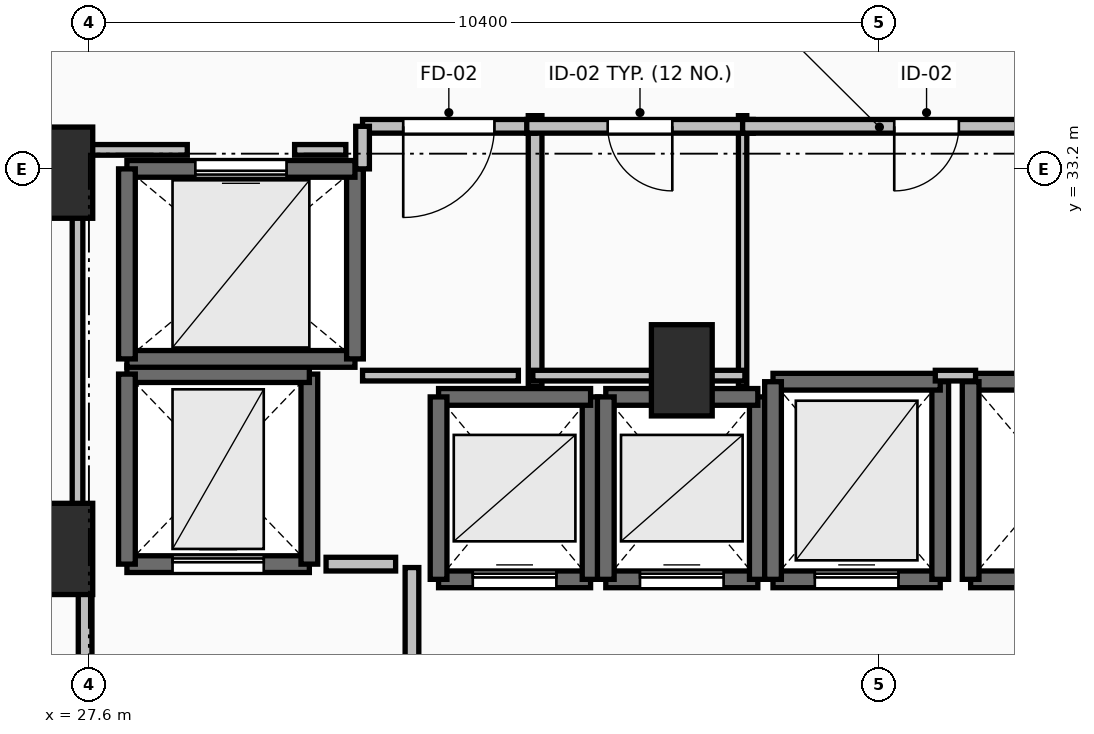
"""IFC4 building model, lengths in metres.
Left out: names, types, materials, properties, quantities, classifications, styles, units other than length and angle.
Written with IfcOpenShell. Run it as: python <this file> out.ifc"""

import sys

from ifc_helpers import new_model, si_unit, direction, frame, frame_2d, origin, origin_2d, place, context, subcontext, project, spatial, rectangle, extrude, element, fill, save


model = new_model("IFC4")
c1 = context("Model", 3, precision=1e-05, world=origin(), true_north=direction((0.0, 1.0)))
c2 = subcontext(c1, "Body", "Model", "MODEL_VIEW")
j1 = project(units=[si_unit("LENGTHUNIT", "METRE"), si_unit("PLANEANGLEUNIT", "RADIAN")], contexts=[c1])
p1 = place(None, origin())
s1 = spatial("IfcSite", under=j1, at=p1, CompositionType="ELEMENT")
p2 = place(p1, origin())
s2 = spatial("IfcBuilding", under=s1, at=p2, CompositionType="ELEMENT")
p3 = place(p2, frame((0.0, 0.0, 55.5)))
s3 = spatial("IfcBuildingStorey", under=s2, at=p3, CompositionType="ELEMENT", Elevation=55.5)
for number, where, z_axis, x_axis in (
    (1, (27.25, 28.2, 0.0), (0.0, 0.0, 1.0), (1.0, 0.0, 0.0)),
    (2, (27.25, 33.15, 0.0), (0.0, 0.0, 1.0), (1.0, 0.0, 0.0)),
    (3, (35.4, 30.55, 0.0), (0.0, 0.0, 1.0), (1.0, 0.0, 0.0)),
):
    element("IfcColumn", number, at=place(p3, frame(where, z_axis=z_axis, x_axis=x_axis)), inside=s3, PredefinedType="PILASTER", context=c2, shape_type="SweptSolid", body=[
        extrude(rectangle(XDim=0.8, YDim=1.2, at=origin_2d()), origin(), (0.0, 0.0, 1.0), 3.5),
    ])
p4 = place(p3, frame((32.2, 27.8, 0.0), z_axis=(0.0, 0.0, 1.0), x_axis=(1.0, 0.0, 0.0)))
e4 = element("IfcWall", 4, at=p4, inside=s3, PredefinedType="SOLIDWALL", context=c2, shape_type="SweptSolid", body=[
    extrude(rectangle(XDim=2.0, YDim=0.22, at=frame_2d((1.0, 0.0))), origin(), (0.0, 0.0, 1.0), 3.24),
])
p5 = place(p4, frame((0.45, 0.0, 0.0)))
e5 = element("IfcOpeningElement", 5, at=p5, cuts=e4, PredefinedType="OPENING", context=c2, shape_type="SweptSolid", body=[
    extrude(rectangle(XDim=1.1, YDim=2.2, at=frame_2d((0.55, 1.1))), frame((0.0, 0.125, 0.0), z_axis=(0.0, -1.0, 0.0), x_axis=(1.0, 0.0, 0.0)), (0.0, 0.0, 1.0), 0.25),
])
p6 = place(p3, frame((34.2, 27.8, 0.0), z_axis=(0.0, 0.0, 1.0), x_axis=(0.0, 1.0, 0.0)))
e6 = element("IfcWall", 6, at=p6, inside=s3, PredefinedType="SOLIDWALL", context=c2, shape_type="SweptSolid", body=[
    extrude(rectangle(XDim=2.4, YDim=0.22, at=frame_2d((1.2, 0.0))), origin(), (0.0, 0.0, 1.0), 3.24),
])
p7 = place(p3, frame((34.2, 30.2, 0.0), z_axis=(0.0, 0.0, 1.0), x_axis=(-1.0, 0.0, 0.0)))
e7 = element("IfcWall", 7, at=p7, inside=s3, PredefinedType="SOLIDWALL", context=c2, shape_type="SweptSolid", body=[
    extrude(rectangle(XDim=2.0, YDim=0.22, at=frame_2d((1.0, 0.0))), origin(), (0.0, 0.0, 1.0), 3.24),
])
p8 = place(p3, frame((32.2, 30.2, 0.0), z_axis=(0.0, 0.0, 1.0), x_axis=(0.0, -1.0, 0.0)))
e8 = element("IfcWall", 8, at=p8, inside=s3, PredefinedType="SOLIDWALL", context=c2, shape_type="SweptSolid", body=[
    extrude(rectangle(XDim=2.4, YDim=0.22, at=frame_2d((1.2, 0.0))), origin(), (0.0, 0.0, 1.0), 3.24),
])
p9 = place(p3, frame((34.4, 27.8, 0.0), z_axis=(0.0, 0.0, 1.0), x_axis=(1.0, 0.0, 0.0)))
e9 = element("IfcWall", 9, at=p9, inside=s3, PredefinedType="SOLIDWALL", context=c2, shape_type="SweptSolid", body=[
    extrude(rectangle(XDim=2.0, YDim=0.22, at=frame_2d((1.0, 0.0))), origin(), (0.0, 0.0, 1.0), 3.24),
])
p10 = place(p9, frame((0.45, 0.0, 0.0)))
e10 = element("IfcOpeningElement", 10, at=p10, cuts=e9, PredefinedType="OPENING", context=c2, shape_type="SweptSolid", body=[
    extrude(rectangle(XDim=1.1, YDim=2.2, at=frame_2d((0.55, 1.1))), frame((0.0, 0.125, 0.0), z_axis=(0.0, -1.0, 0.0), x_axis=(1.0, 0.0, 0.0)), (0.0, 0.0, 1.0), 0.25),
])
p11 = place(p3, frame((36.4, 27.8, 0.0), z_axis=(0.0, 0.0, 1.0), x_axis=(0.0, 1.0, 0.0)))
e11 = element("IfcWall", 11, at=p11, inside=s3, PredefinedType="SOLIDWALL", context=c2, shape_type="SweptSolid", body=[
    extrude(rectangle(XDim=2.4, YDim=0.22, at=frame_2d((1.2, 0.0))), origin(), (0.0, 0.0, 1.0), 3.24),
])
p12 = place(p3, frame((36.4, 30.2, 0.0), z_axis=(0.0, 0.0, 1.0), x_axis=(-1.0, 0.0, 0.0)))
e12 = element("IfcWall", 12, at=p12, inside=s3, PredefinedType="SOLIDWALL", context=c2, shape_type="SweptSolid", body=[
    extrude(rectangle(XDim=2.0, YDim=0.22, at=frame_2d((1.0, 0.0))), origin(), (0.0, 0.0, 1.0), 3.24),
])
p13 = place(p3, frame((34.4, 30.2, 0.0), z_axis=(0.0, 0.0, 1.0), x_axis=(0.0, -1.0, 0.0)))
e13 = element("IfcWall", 13, at=p13, inside=s3, PredefinedType="SOLIDWALL", context=c2, shape_type="SweptSolid", body=[
    extrude(rectangle(XDim=2.4, YDim=0.22, at=frame_2d((1.2, 0.0))), origin(), (0.0, 0.0, 1.0), 3.24),
])
p14 = place(p3, frame((36.6, 27.8, 0.0), z_axis=(0.0, 0.0, 1.0), x_axis=(1.0, 0.0, 0.0)))
e14 = element("IfcWall", 14, at=p14, inside=s3, PredefinedType="SOLIDWALL", context=c2, shape_type="SweptSolid", body=[
    extrude(rectangle(XDim=2.2, YDim=0.22, at=frame_2d((1.1, 0.0))), origin(), (0.0, 0.0, 1.0), 3.24),
])
p15 = place(p14, frame((0.55, 0.0, 0.0)))
e15 = element("IfcOpeningElement", 15, at=p15, cuts=e14, PredefinedType="OPENING", context=c2, shape_type="SweptSolid", body=[
    extrude(rectangle(XDim=1.1, YDim=2.2, at=frame_2d((0.55, 1.1))), frame((0.0, 0.125, 0.0), z_axis=(0.0, -1.0, 0.0), x_axis=(1.0, 0.0, 0.0)), (0.0, 0.0, 1.0), 0.25),
])
p16 = place(p3, frame((38.8, 27.8, 0.0), z_axis=(0.0, 0.0, 1.0), x_axis=(0.0, 1.0, 0.0)))
e16 = element("IfcWall", 16, at=p16, inside=s3, PredefinedType="SOLIDWALL", context=c2, shape_type="SweptSolid", body=[
    extrude(rectangle(XDim=2.6, YDim=0.22, at=frame_2d((1.3, 0.0))), origin(), (0.0, 0.0, 1.0), 3.24),
])
p17 = place(p3, frame((38.8, 30.4, 0.0), z_axis=(0.0, 0.0, 1.0), x_axis=(-1.0, 0.0, 0.0)))
e17 = element("IfcWall", 17, at=p17, inside=s3, PredefinedType="SOLIDWALL", context=c2, shape_type="SweptSolid", body=[
    extrude(rectangle(XDim=2.2, YDim=0.22, at=frame_2d((1.1, 0.0))), origin(), (0.0, 0.0, 1.0), 3.24),
])
p18 = place(p3, frame((36.6, 30.4, 0.0), z_axis=(0.0, 0.0, 1.0), x_axis=(0.0, -1.0, 0.0)))
e18 = element("IfcWall", 18, at=p18, inside=s3, PredefinedType="SOLIDWALL", context=c2, shape_type="SweptSolid", body=[
    extrude(rectangle(XDim=2.6, YDim=0.22, at=frame_2d((1.3, 0.0))), origin(), (0.0, 0.0, 1.0), 3.24),
])
for number, where, z_axis, x_axis in (
    (19, (39.2, 27.8, 0.0), (0.0, 0.0, 1.0), (1.0, 0.0, 0.0)),
    (20, (41.4, 30.4, 0.0), (0.0, 0.0, 1.0), (-1.0, 0.0, 0.0)),
):
    element("IfcWall", number, at=place(p3, frame(where, z_axis=z_axis, x_axis=x_axis)), inside=s3, PredefinedType="SOLIDWALL", context=c2, shape_type="SweptSolid", body=[
        extrude(rectangle(XDim=2.2, YDim=0.22, at=frame_2d((1.1, 0.0))), origin(), (0.0, 0.0, 1.0), 3.24),
    ])
p19 = place(p3, frame((39.2, 30.4, 0.0), z_axis=(0.0, 0.0, 1.0), x_axis=(0.0, -1.0, 0.0)))
e21 = element("IfcWall", 21, at=p19, inside=s3, PredefinedType="SOLIDWALL", context=c2, shape_type="SweptSolid", body=[
    extrude(rectangle(XDim=2.6, YDim=0.22, at=frame_2d((1.3, 0.0))), origin(), (0.0, 0.0, 1.0), 3.24),
])
p20 = place(p3, frame((28.1, 28.0, 0.0), z_axis=(0.0, 0.0, 1.0), x_axis=(1.0, 0.0, 0.0)))
e22 = element("IfcWall", 22, at=p20, inside=s3, PredefinedType="SHEAR", context=c2, shape_type="SweptSolid", body=[
    extrude(rectangle(XDim=2.4, YDim=0.22, at=frame_2d((1.2, 0.0))), origin(), (0.0, 0.0, 1.0), 3.24),
])
p21 = place(p20, frame((0.6, 0.0, 0.0)))
e23 = element("IfcOpeningElement", 23, at=p21, cuts=e22, PredefinedType="OPENING", context=c2, shape_type="SweptSolid", body=[
    extrude(rectangle(XDim=1.2, YDim=2.2, at=frame_2d((0.6, 1.1))), frame((0.0, 0.125, 0.0), z_axis=(0.0, -1.0, 0.0), x_axis=(1.0, 0.0, 0.0)), (0.0, 0.0, 1.0), 0.25),
])
p22 = place(p3, frame((30.5, 28.0, 0.0), z_axis=(0.0, 0.0, 1.0), x_axis=(0.0, 1.0, 0.0)))
e24 = element("IfcWall", 24, at=p22, inside=s3, PredefinedType="SHEAR", context=c2, shape_type="SweptSolid", body=[
    extrude(rectangle(XDim=2.5, YDim=0.22, at=frame_2d((1.25, 0.0))), origin(), (0.0, 0.0, 1.0), 3.24),
])
p23 = place(p3, frame((30.5, 30.5, 0.0), z_axis=(0.0, 0.0, 1.0), x_axis=(-1.0, 0.0, 0.0)))
e25 = element("IfcWall", 25, at=p23, inside=s3, PredefinedType="SHEAR", context=c2, shape_type="SweptSolid", body=[
    extrude(rectangle(XDim=2.4, YDim=0.22, at=frame_2d((1.2, 0.0))), origin(), (0.0, 0.0, 1.0), 3.24),
])
p24 = place(p3, frame((28.1, 30.5, 0.0), z_axis=(0.0, 0.0, 1.0), x_axis=(0.0, -1.0, 0.0)))
e26 = element("IfcWall", 26, at=p24, inside=s3, PredefinedType="SHEAR", context=c2, shape_type="SweptSolid", body=[
    extrude(rectangle(XDim=2.5, YDim=0.22, at=frame_2d((1.25, 0.0))), origin(), (0.0, 0.0, 1.0), 3.24),
])
p25 = place(p3, frame((28.1, 30.7, 0.0), z_axis=(0.0, 0.0, 1.0), x_axis=(1.0, 0.0, 0.0)))
e27 = element("IfcWall", 27, at=p25, inside=s3, PredefinedType="SOLIDWALL", context=c2, shape_type="SweptSolid", body=[
    extrude(rectangle(XDim=3.0, YDim=0.22, at=frame_2d((1.5, 0.0))), origin(), (0.0, 0.0, 1.0), 3.24),
])
p26 = place(p3, frame((31.1, 30.7, 0.0), z_axis=(0.0, 0.0, 1.0), x_axis=(0.0, 1.0, 0.0)))
e28 = element("IfcWall", 28, at=p26, inside=s3, PredefinedType="SOLIDWALL", context=c2, shape_type="SweptSolid", body=[
    extrude(rectangle(XDim=2.5, YDim=0.22, at=frame_2d((1.25, 0.0))), origin(), (0.0, 0.0, 1.0), 3.24),
])
p27 = place(p3, frame((31.1, 33.2, 0.0), z_axis=(0.0, 0.0, 1.0), x_axis=(-1.0, 0.0, 0.0)))
e29 = element("IfcWall", 29, at=p27, inside=s3, PredefinedType="SOLIDWALL", context=c2, shape_type="SweptSolid", body=[
    extrude(rectangle(XDim=3.0, YDim=0.22, at=frame_2d((1.5, 0.0))), origin(), (0.0, 0.0, 1.0), 3.24),
])
p28 = place(p27, frame((0.9, 0.0, 0.0)))
e30 = element("IfcOpeningElement", 30, at=p28, cuts=e29, PredefinedType="OPENING", context=c2, shape_type="SweptSolid", body=[
    extrude(rectangle(XDim=1.2, YDim=2.2, at=frame_2d((0.6, 1.1))), frame((0.0, 0.125, 0.0), z_axis=(0.0, -1.0, 0.0), x_axis=(1.0, 0.0, 0.0)), (0.0, 0.0, 1.0), 0.25),
])
p29 = place(p3, frame((28.1, 33.2, 0.0), z_axis=(0.0, 0.0, 1.0), x_axis=(0.0, -1.0, 0.0)))
e31 = element("IfcWall", 31, at=p29, inside=s3, PredefinedType="SOLIDWALL", context=c2, shape_type="SweptSolid", body=[
    extrude(rectangle(XDim=2.5, YDim=0.22, at=frame_2d((1.25, 0.0))), origin(), (0.0, 0.0, 1.0), 3.24),
])
p30 = place(p3, frame((31.85, 24.045, 0.0), z_axis=(0.0, 0.0, 1.0), x_axis=(0.0, 1.0, 0.0)))
e32 = element("IfcWall", 32, at=p30, inside=s3, PredefinedType="PARTITIONING", context=c2, shape_type="SweptSolid", body=[
    extrude(rectangle(XDim=3.91, YDim=0.18, at=frame_2d((1.955, 0.0))), origin(), (0.0, 0.0, 1.0), 3.24),
])
p31 = place(p30, frame((1.355, 0.0, 0.0)))
e33 = element("IfcOpeningElement", 33, at=p31, cuts=e32, PredefinedType="OPENING", context=c2, shape_type="SweptSolid", body=[
    extrude(rectangle(XDim=1.2, YDim=2.15, at=frame_2d((0.6, 1.075))), frame((0.0, 0.105, 0.0), z_axis=(0.0, -1.0, 0.0), x_axis=(1.0, 0.0, 0.0)), (0.0, 0.0, 1.0), 0.21),
])
p32 = place(p3, frame((27.55, 28.0, 0.0), z_axis=(0.0, 0.0, 1.0), x_axis=(0.0, -1.0, 0.0)))
e34 = element("IfcWall", 34, at=p32, inside=s3, PredefinedType="PARTITIONING", context=c2, shape_type="SweptSolid", body=[
    extrude(rectangle(XDim=4.05, YDim=0.18, at=frame_2d((2.025, 0.0))), origin(), (0.0, 0.0, 1.0), 3.24),
])
p33 = place(p32, frame((1.425, 0.0, 0.0)))
e35 = element("IfcOpeningElement", 35, at=p33, cuts=e34, PredefinedType="OPENING", context=c2, shape_type="SweptSolid", body=[
    extrude(rectangle(XDim=1.2, YDim=2.15, at=frame_2d((0.6, 1.075))), frame((0.0, 0.105, 0.0), z_axis=(0.0, -1.0, 0.0), x_axis=(1.0, 0.0, 0.0)), (0.0, 0.0, 1.0), 0.21),
])
p34 = place(p3, frame((33.47, 30.34, 0.0), z_axis=(0.0, 0.0, 1.0), x_axis=(0.0, 1.0, 0.0)))
e36 = element("IfcWall", 36, at=p34, inside=s3, PredefinedType="PARTITIONING", context=c2, shape_type="SweptSolid", body=[
    extrude(rectangle(XDim=3.56, YDim=0.18, at=frame_2d((1.78, 0.0))), origin(), (0.0, 0.0, 1.0), 3.24),
])
p35 = place(p3, frame((33.47, 33.76, 0.0), z_axis=(0.0, 0.0, 1.0), x_axis=(-1.0, 0.0, 0.0)))
e37 = element("IfcWall", 37, at=p35, inside=s3, PredefinedType="PARTITIONING", context=c2, shape_type="SweptSolid", body=[
    extrude(rectangle(XDim=2.27, YDim=0.18, at=frame_2d((1.135, 0.0))), origin(), (0.0, 0.0, 1.0), 3.24),
])
p36 = place(p35, frame((0.535, 0.0, 0.0)))
e38 = element("IfcOpeningElement", 38, at=p36, cuts=e37, PredefinedType="OPENING", context=c2, shape_type="SweptSolid", body=[
    extrude(rectangle(XDim=1.2, YDim=2.15, at=frame_2d((0.6, 1.075))), frame((0.0, 0.105, 0.0), z_axis=(0.0, -1.0, 0.0), x_axis=(1.0, 0.0, 0.0)), (0.0, 0.0, 1.0), 0.21),
])
p37 = place(p3, frame((31.2, 33.76, 0.0), z_axis=(0.0, 0.0, 1.0), x_axis=(0.0, -1.0, 0.0)))
e39 = element("IfcWall", 39, at=p37, inside=s3, PredefinedType="PARTITIONING", context=c2, shape_type="SweptSolid", body=[
    extrude(rectangle(XDim=0.56, YDim=0.18, at=frame_2d((0.28, 0.0))), origin(), (0.0, 0.0, 1.0), 3.24),
])
p38 = place(p3, frame((36.2, 30.34, 0.0), z_axis=(0.0, 0.0, 1.0), x_axis=(0.0, 1.0, 0.0)))
e40 = element("IfcWall", 40, at=p38, inside=s3, PredefinedType="PARTITIONING", context=c2, shape_type="SweptSolid", body=[
    extrude(rectangle(XDim=3.56, YDim=0.11, at=frame_2d((1.78, 0.0))), origin(), (0.0, 0.0, 1.0), 2.432),
])
p39 = place(p3, frame((36.34, 33.76, 0.0), z_axis=(0.0, 0.0, 1.0), x_axis=(-1.0, 0.0, 0.0)))
e41 = element("IfcWall", 41, at=p39, inside=s3, PredefinedType="PARTITIONING", context=c2, shape_type="SweptSolid", body=[
    extrude(rectangle(XDim=2.98, YDim=0.18, at=frame_2d((1.49, 0.0))), origin(), (0.0, 0.0, 1.0), 3.24),
])
p40 = place(p39, frame((1.065, 0.0, 0.0)))
e42 = element("IfcOpeningElement", 42, at=p40, cuts=e41, PredefinedType="OPENING", context=c2, shape_type="SweptSolid", body=[
    extrude(rectangle(XDim=0.85, YDim=2.1, at=frame_2d((0.425, 1.05))), frame((0.0, 0.105, 0.0), z_axis=(0.0, -1.0, 0.0), x_axis=(1.0, 0.0, 0.0)), (0.0, 0.0, 1.0), 0.21),
])
p41 = place(p3, frame((41.04, 33.76, 0.0), z_axis=(0.0, 0.0, 1.0), x_axis=(-1.0, 0.0, 0.0)))
e43 = element("IfcWall", 43, at=p41, inside=s3, PredefinedType="PARTITIONING", context=c2, shape_type="SweptSolid", body=[
    extrude(rectangle(XDim=4.84, YDim=0.18, at=frame_2d((2.42, 0.0))), origin(), (0.0, 0.0, 1.0), 3.24),
])
p42 = place(p41, frame((1.995, 0.0, 0.0)))
e44 = element("IfcOpeningElement", 44, at=p42, cuts=e43, PredefinedType="OPENING", context=c2, shape_type="SweptSolid", body=[
    extrude(rectangle(XDim=0.85, YDim=2.1, at=frame_2d((0.425, 1.05))), frame((0.0, 0.105, 0.0), z_axis=(0.0, -1.0, 0.0), x_axis=(1.0, 0.0, 0.0)), (0.0, 0.0, 1.0), 0.21),
])
p43 = place(p3, frame((31.635, 28.0, 0.0), z_axis=(0.0, 0.0, 1.0), x_axis=(-1.0, 0.0, 0.0)))
e45 = element("IfcWall", 45, at=p43, inside=s3, PredefinedType="PARTITIONING", context=c2, shape_type="SweptSolid", body=[
    extrude(rectangle(XDim=0.915, YDim=0.18, at=frame_2d((0.458, 0.0))), origin(), (0.0, 0.0, 1.0), 3.24),
])
p44 = place(p3, frame((31.2, 30.48, 0.0), z_axis=(0.0, 0.0, 1.0), x_axis=(1.0, 0.0, 0.0)))
e46 = element("IfcWall", 46, at=p44, inside=s3, PredefinedType="PARTITIONING", context=c2, shape_type="SweptSolid", body=[
    extrude(rectangle(XDim=2.05, YDim=0.14, at=frame_2d((1.025, 0.0))), origin(), (0.0, 0.0, 1.0), 3.24),
])
p45 = place(p3, frame((33.44, 30.48, 0.0), z_axis=(0.0, 0.0, 1.0), x_axis=(1.0, 0.0, 0.0)))
e47 = element("IfcWall", 47, at=p45, inside=s3, PredefinedType="PARTITIONING", context=c2, shape_type="SweptSolid", body=[
    extrude(rectangle(XDim=2.79, YDim=0.14, at=frame_2d((1.395, 0.0))), origin(), (0.0, 0.0, 1.0), 2.432),
])
p46 = place(p3, frame((38.735, 30.48, 0.0), z_axis=(0.0, 0.0, 1.0), x_axis=(1.0, 0.0, 0.0)))
e48 = element("IfcWall", 48, at=p46, inside=s3, PredefinedType="PARTITIONING", context=c2, shape_type="SweptSolid", body=[
    extrude(rectangle(XDim=0.53, YDim=0.14, at=frame_2d((0.265, 0.0))), origin(), (0.0, 0.0, 1.0), 2.432),
])
p47 = place(p3, frame((27.45, 28.196, 0.0), z_axis=(0.0, 0.0, 1.0), x_axis=(0.0, 1.0, 0.0)))
e49 = element("IfcWall", 49, at=p47, inside=s3, PredefinedType="PARTITIONING", context=c2, shape_type="SweptSolid", body=[
    extrude(rectangle(XDim=5.254, YDim=0.14, at=frame_2d((2.627, 0.0))), origin(), (0.0, 0.0, 1.0), 2.432),
])
p48 = place(p3, frame((27.45, 33.45, 0.0), z_axis=(0.0, 0.0, 1.0), x_axis=(1.0, 0.0, 0.0)))
e50 = element("IfcWall", 50, at=p48, inside=s3, PredefinedType="PARTITIONING", context=c2, shape_type="SweptSolid", body=[
    extrude(rectangle(XDim=1.444, YDim=0.14, at=frame_2d((0.722, 0.0))), origin(), (0.0, 0.0, 1.0), 2.432),
])
p49 = place(p3, frame((30.306, 33.45, 0.0), z_axis=(0.0, 0.0, 1.0), x_axis=(1.0, 0.0, 0.0)))
e51 = element("IfcWall", 51, at=p49, inside=s3, PredefinedType="PARTITIONING", context=c2, shape_type="SweptSolid", body=[
    extrude(rectangle(XDim=0.674, YDim=0.14, at=frame_2d((0.337, 0.0))), origin(), (0.0, 0.0, 1.0), 3.24),
])
p50 = place(p5, origin())
e52 = element("IfcDoor", 52, at=p50, inside=s3, OperationType="SLIDING_TO_LEFT", PredefinedType="DOOR", context=c2, shape_type="SweptSolid", body=[
    extrude(rectangle(XDim=1.1, YDim=2.2, at=frame_2d((0.55, 1.1))), frame((0.0, 0.025, 0.0), z_axis=(0.0, -1.0, 0.0), x_axis=(1.0, 0.0, 0.0)), (0.0, 0.0, 1.0), 0.05),
])
fill(e5, e52)
p51 = place(p10, origin())
e53 = element("IfcDoor", 53, at=p51, inside=s3, OperationType="SLIDING_TO_LEFT", PredefinedType="DOOR", context=c2, shape_type="SweptSolid", body=[
    extrude(rectangle(XDim=1.1, YDim=2.2, at=frame_2d((0.55, 1.1))), frame((0.0, 0.025, 0.0), z_axis=(0.0, -1.0, 0.0), x_axis=(1.0, 0.0, 0.0)), (0.0, 0.0, 1.0), 0.05),
])
fill(e10, e53)
p52 = place(p15, origin())
e54 = element("IfcDoor", 54, at=p52, inside=s3, OperationType="SLIDING_TO_LEFT", PredefinedType="DOOR", context=c2, shape_type="SweptSolid", body=[
    extrude(rectangle(XDim=1.1, YDim=2.2, at=frame_2d((0.55, 1.1))), frame((0.0, 0.025, 0.0), z_axis=(0.0, -1.0, 0.0), x_axis=(1.0, 0.0, 0.0)), (0.0, 0.0, 1.0), 0.05),
])
fill(e15, e54)
p53 = place(p21, origin())
e55 = element("IfcDoor", 55, at=p53, inside=s3, OperationType="SLIDING_TO_LEFT", PredefinedType="DOOR", context=c2, shape_type="SweptSolid", body=[
    extrude(rectangle(XDim=1.2, YDim=2.2, at=frame_2d((0.6, 1.1))), frame((0.0, 0.025, 0.0), z_axis=(0.0, -1.0, 0.0), x_axis=(1.0, 0.0, 0.0)), (0.0, 0.0, 1.0), 0.05),
])
fill(e23, e55)
p54 = place(p28, origin())
e56 = element("IfcDoor", 56, at=p54, inside=s3, OperationType="SLIDING_TO_LEFT", PredefinedType="DOOR", context=c2, shape_type="SweptSolid", body=[
    extrude(rectangle(XDim=1.2, YDim=2.2, at=frame_2d((0.6, 1.1))), frame((0.0, 0.025, 0.0), z_axis=(0.0, -1.0, 0.0), x_axis=(1.0, 0.0, 0.0)), (0.0, 0.0, 1.0), 0.05),
])
fill(e30, e56)
p55 = place(p36, origin())
e57 = element("IfcDoor", 57, at=p55, inside=s3, OperationType="SINGLE_SWING_RIGHT", PredefinedType="DOOR", context=c2, shape_type="SweptSolid", body=[
    extrude(rectangle(XDim=1.2, YDim=2.15, at=frame_2d((0.6, 1.075))), frame((0.0, 0.025, 0.0), z_axis=(0.0, -1.0, 0.0), x_axis=(1.0, 0.0, 0.0)), (0.0, 0.0, 1.0), 0.05),
])
fill(e38, e57)
p56 = place(p40, origin())
e58 = element("IfcDoor", 58, at=p56, inside=s3, OperationType="SINGLE_SWING_LEFT", PredefinedType="DOOR", context=c2, shape_type="SweptSolid", body=[
    extrude(rectangle(XDim=0.85, YDim=2.1, at=frame_2d((0.425, 1.05))), frame((0.0, 0.025, 0.0), z_axis=(0.0, -1.0, 0.0), x_axis=(1.0, 0.0, 0.0)), (0.0, 0.0, 1.0), 0.05),
])
fill(e42, e58)
p57 = place(p42, origin())
e59 = element("IfcDoor", 59, at=p57, inside=s3, OperationType="SINGLE_SWING_RIGHT", PredefinedType="DOOR", context=c2, shape_type="SweptSolid", body=[
    extrude(rectangle(XDim=0.85, YDim=2.1, at=frame_2d((0.425, 1.05))), frame((0.0, 0.025, 0.0), z_axis=(0.0, -1.0, 0.0), x_axis=(1.0, 0.0, 0.0)), (0.0, 0.0, 1.0), 0.05),
])
fill(e44, e59)
save(model, sys.argv[1])
